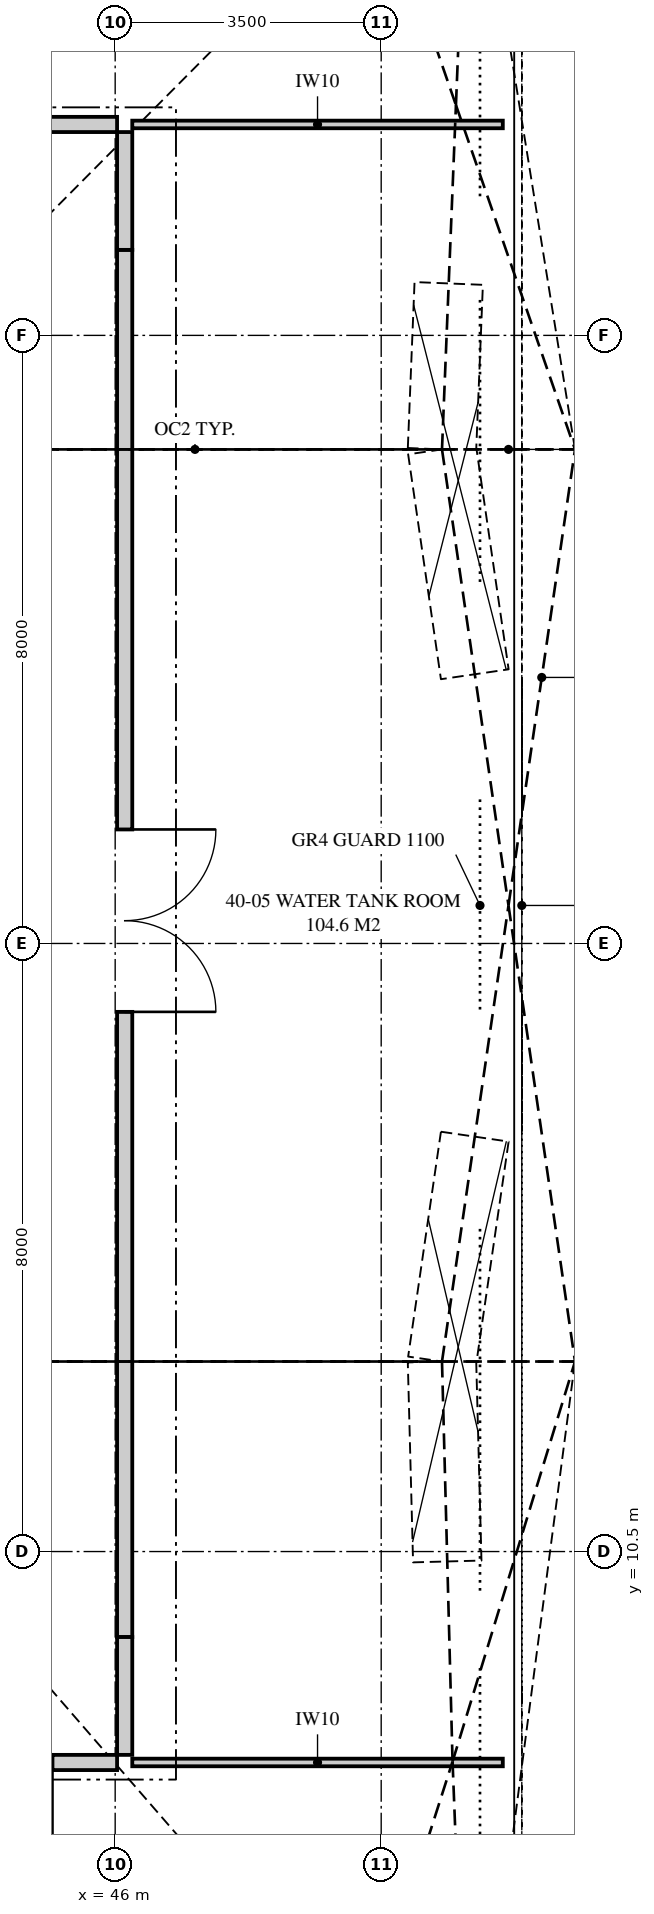
"""IFC4 building model, lengths in metres.
Left out: names, types, materials, properties, quantities, classifications, styles, units other than length and angle.
Written with IfcOpenShell. Run it as: python <this file> out.ifc"""

import sys

from ifc_helpers import new_model, si_unit, direction, frame, frame_2d, origin, place, context, subcontext, project, spatial, polyline, rectangle, outline, extrude, element, fill, save


model = new_model("IFC4")
c1 = context("Model", 3, precision=1e-05, world=origin(), true_north=direction((0.0, 1.0)))
c2 = subcontext(c1, "Body", "Model", "MODEL_VIEW")
j1 = project(units=[si_unit("LENGTHUNIT", "METRE"), si_unit("PLANEANGLEUNIT", "RADIAN")], contexts=[c1])
p1 = place(None, origin())
s1 = spatial("IfcSite", under=j1, at=p1, CompositionType="ELEMENT")
p2 = place(p1, origin())
s2 = spatial("IfcBuilding", under=s1, at=p2, CompositionType="ELEMENT")
p3 = place(p2, frame((0.0, 0.0, 149.35)))
s3 = spatial("IfcBuildingStorey", under=s2, at=p3, CompositionType="ELEMENT", Elevation=149.35)
p4 = place(p3, frame((17.775, 7.725, 0.0), z_axis=(0.0, 0.0, 1.0), x_axis=(1.0, 0.0, 0.0)))
e1 = element("IfcWall", 1, at=p4, inside=s3, PredefinedType="PARTITIONING", context=c2, shape_type="SweptSolid", body=[
    extrude(outline(polyline([(0.0, 0.0), (28.25, 0.0), (28.25, 2.52), (27.466, 2.52), (27.466, 4.72), (20.724, 4.72), (20.724, 4.141), (19.945, 4.141), (19.945, 4.72), (17.341, 4.72), (17.341, 4.141), (16.364, 4.141), (16.364, 4.72), (15.01, 4.72), (15.01, 4.208), (14.44, 4.208), (14.44, 4.72), (11.722, 4.72), (11.722, 4.141), (10.851, 4.141), (10.851, 4.72), (8.664, 4.72), (8.664, 4.141), (7.819, 4.141), (7.819, 4.72), (3.349, 4.72), (3.349, 4.141), (2.388, 4.141), (2.388, 4.72), (1.105, 4.72), (1.105, 2.52), (0.0, 2.52), (0.0, 0.0)]), holes=[polyline([(13.78, 3.239), (13.834, 3.353), (14.381, 3.423), (14.381, 2.917), (14.326, 2.803), (13.78, 2.732), (13.78, 3.239)])]), frame((0.0, 0.1, 0.0), z_axis=(0.0, -1.0, 0.0), x_axis=(1.0, 0.0, 0.0)), (0.0, 0.0, 1.0), 0.2),
])
p5 = place(p4, frame((0.85, 0.0, 0.0)))
e2 = element("IfcOpeningElement", 2, at=p5, cuts=e1, PredefinedType="OPENING", context=c2, shape_type="SweptSolid", body=[
    extrude(rectangle(XDim=1.0, YDim=2.1, at=frame_2d((0.5, 1.05))), frame((0.0, 0.11, 0.0), z_axis=(0.0, -1.0, 0.0), x_axis=(1.0, 0.0, 0.0)), (0.0, 0.0, 1.0), 0.22),
])
p6 = place(p4, frame((26.4, 0.0, 0.0)))
e3 = element("IfcOpeningElement", 3, at=p6, cuts=e1, PredefinedType="OPENING", context=c2, shape_type="SweptSolid", body=[
    extrude(rectangle(XDim=1.0, YDim=2.1, at=frame_2d((0.5, 1.05))), frame((0.0, 0.11, 0.0), z_axis=(0.0, -1.0, 0.0), x_axis=(1.0, 0.0, 0.0)), (0.0, 0.0, 1.0), 0.22),
])
p7 = place(p3, frame((46.125, 7.825, 0.0), z_axis=(0.0, 0.0, 1.0), x_axis=(0.0, 1.0, 0.0)))
e4 = element("IfcWall", 4, at=p7, inside=s3, PredefinedType="PARTITIONING", context=c2, shape_type="SweptSolid", body=[
    extrude(outline(polyline([(0.0, 0.0), (1.55, 0.0), (1.55, 4.72), (0.622, 4.72), (0.622, 2.52), (0.0, 2.52), (0.0, 0.0)])), frame((0.0, 0.1, 0.0), z_axis=(0.0, -1.0, 0.0), x_axis=(1.0, 0.0, 0.0)), (0.0, 0.0, 1.0), 0.2),
])
p8 = place(p3, frame((17.775, 29.275, 0.0), z_axis=(0.0, 0.0, 1.0), x_axis=(1.0, 0.0, 0.0)))
e5 = element("IfcWall", 5, at=p8, inside=s3, PredefinedType="PARTITIONING", context=c2, shape_type="SweptSolid", body=[
    extrude(outline(polyline([(0.0, 0.0), (28.25, 0.0), (28.25, 2.52), (27.728, 2.52), (27.728, 4.72), (20.598, 4.72), (20.598, 4.141), (19.667, 4.141), (19.667, 4.72), (15.01, 4.72), (15.01, 4.208), (14.44, 4.208), (14.44, 4.72), (11.449, 4.72), (11.449, 4.141), (10.512, 4.141), (10.512, 4.72), (8.986, 4.72), (8.986, 4.141), (8.079, 4.141), (8.079, 4.72), (3.181, 4.72), (3.181, 4.141), (2.638, 4.141), (2.638, 4.72), (0.885, 4.72), (0.885, 2.52), (0.0, 2.52), (0.0, 0.0)]), holes=[polyline([(13.78, 3.239), (13.834, 3.353), (14.381, 3.423), (14.381, 2.917), (14.326, 2.803), (13.78, 2.732), (13.78, 3.239)])]), frame((0.0, 0.1, 0.0), z_axis=(0.0, -1.0, 0.0), x_axis=(1.0, 0.0, 0.0)), (0.0, 0.0, 1.0), 0.2),
])
p9 = place(p8, frame((13.825, 0.0, 0.0)))
e6 = element("IfcOpeningElement", 6, at=p9, cuts=e5, PredefinedType="OPENING", context=c2, shape_type="SweptSolid", body=[
    extrude(rectangle(XDim=2.4, YDim=2.4, at=frame_2d((1.2, 1.2))), frame((0.0, 0.11, 0.0), z_axis=(0.0, -1.0, 0.0), x_axis=(1.0, 0.0, 0.0)), (0.0, 0.0, 1.0), 0.22),
])
p10 = place(p3, frame((46.125, 27.625, 0.0), z_axis=(0.0, 0.0, 1.0), x_axis=(0.0, 1.0, 0.0)))
e7 = element("IfcWall", 7, at=p10, inside=s3, PredefinedType="PARTITIONING", context=c2, shape_type="SweptSolid", body=[
    extrude(outline(polyline([(0.0, 0.0), (1.55, 0.0), (1.55, 2.52), (0.656, 2.52), (0.656, 4.72), (0.0, 4.72), (0.0, 0.0)])), frame((0.0, 0.1, 0.0), z_axis=(0.0, -1.0, 0.0), x_axis=(1.0, 0.0, 0.0)), (0.0, 0.0, 1.0), 0.2),
])
p11 = place(p3, frame((46.125, 9.375, 0.0), z_axis=(0.0, 0.0, 1.0), x_axis=(0.0, 1.0, 0.0)))
e8 = element("IfcWall", 8, at=p11, inside=s3, PredefinedType="PARTITIONING", context=c2, shape_type="SweptSolid", body=[
    extrude(outline(polyline([(18.25, 0.0), (18.25, 4.72), (15.975, 4.72), (15.975, 4.02), (15.275, 4.02), (15.275, 4.72), (3.975, 4.72), (3.975, 4.02), (3.275, 4.02), (3.275, 4.72), (0.0, 4.72), (0.0, 0.0), (18.25, 0.0)]), holes=[polyline([(3.396, 2.171), (3.396, 2.992), (3.854, 2.992), (3.854, 2.171), (3.396, 2.171)]), polyline([(15.396, 2.171), (15.396, 2.992), (15.854, 2.992), (15.854, 2.171), (15.396, 2.171)])]), frame((0.0, 0.1, 0.0), z_axis=(0.0, -1.0, 0.0), x_axis=(1.0, 0.0, 0.0)), (0.0, 0.0, 1.0), 0.2),
])
p12 = place(p11, frame((8.225, 0.0, 0.0)))
e9 = element("IfcOpeningElement", 9, at=p12, cuts=e8, PredefinedType="OPENING", context=c2, shape_type="SweptSolid", body=[
    extrude(rectangle(XDim=2.4, YDim=2.4, at=frame_2d((1.2, 1.2))), frame((0.0, 0.11, 0.0), z_axis=(0.0, -1.0, 0.0), x_axis=(1.0, 0.0, 0.0)), (0.0, 0.0, 1.0), 0.22),
])
p13 = place(p3, frame((46.225, 7.725, 0.0), z_axis=(0.0, 0.0, 1.0), x_axis=(1.0, 0.0, 0.0)))
e10 = element("IfcWall", 10, at=p13, inside=s3, PredefinedType="PARTITIONING", context=c2, shape_type="SweptSolid", body=[
    extrude(outline(polyline([(0.469, 2.52), (0.0, 2.52), (0.0, 0.0), (4.875, 0.0), (4.875, 3.5), (4.265, 3.5), (4.265, 4.72), (0.469, 4.72), (0.469, 2.52)]), holes=[polyline([(4.654, 2.261), (4.654, 1.38), (4.656, 1.369), (4.654, 1.366), (4.654, 1.362), (4.652, 1.363), (4.625, 1.324), (4.623, 1.271), (4.256, 1.266), (3.764, 1.198), (3.764, 2.09), (3.778, 2.11), (3.778, 2.11), (3.801, 2.147), (3.802, 2.147), (3.802, 2.152), (3.807, 2.208), (4.333, 2.218), (4.654, 2.261)])]), frame((0.0, 0.05, 0.0), z_axis=(0.0, -1.0, 0.0), x_axis=(1.0, 0.0, 0.0)), (0.0, 0.0, 1.0), 0.1),
])
p14 = place(p3, frame((46.225, 29.275, 0.0), z_axis=(0.0, 0.0, 1.0), x_axis=(1.0, 0.0, 0.0)))
e11 = element("IfcWall", 11, at=p14, inside=s3, PredefinedType="PARTITIONING", context=c2, shape_type="SweptSolid", body=[
    extrude(outline(polyline([(0.836, 2.52), (0.0, 2.52), (0.0, 0.0), (4.875, 0.0), (4.875, 1.5), (4.66, 1.5), (4.66, 1.297), (4.656, 1.229), (3.836, 1.21), (3.836, 2.145), (3.841, 2.212), (3.896, 2.213), (3.896, 2.357), (3.935, 2.416), (4.797, 2.556), (4.875, 2.556), (4.875, 3.5), (4.263, 3.5), (4.263, 4.72), (0.836, 4.72), (0.836, 2.52)])), frame((0.0, 0.05, 0.0), z_axis=(0.0, -1.0, 0.0), x_axis=(1.0, 0.0, 0.0)), (0.0, 0.0, 1.0), 0.1),
])
p15 = place(p12, frame((2.4, 0.0, 0.0), z_axis=(0.0, 0.0, 1.0), x_axis=(-1.0, 0.0, 0.0)))
e12 = element("IfcDoor", 12, at=p15, inside=s3, OperationType="DOUBLE_DOOR_SINGLE_SWING", PredefinedType="DOOR", context=c2, shape_type="SweptSolid", body=[
    extrude(rectangle(XDim=2.4, YDim=2.4, at=frame_2d((1.2, 1.2))), frame((0.0, 0.025, 0.0), z_axis=(0.0, -1.0, 0.0), x_axis=(1.0, 0.0, 0.0)), (0.0, 0.0, 1.0), 0.05),
])
fill(e9, e12)
save(model, sys.argv[1])
